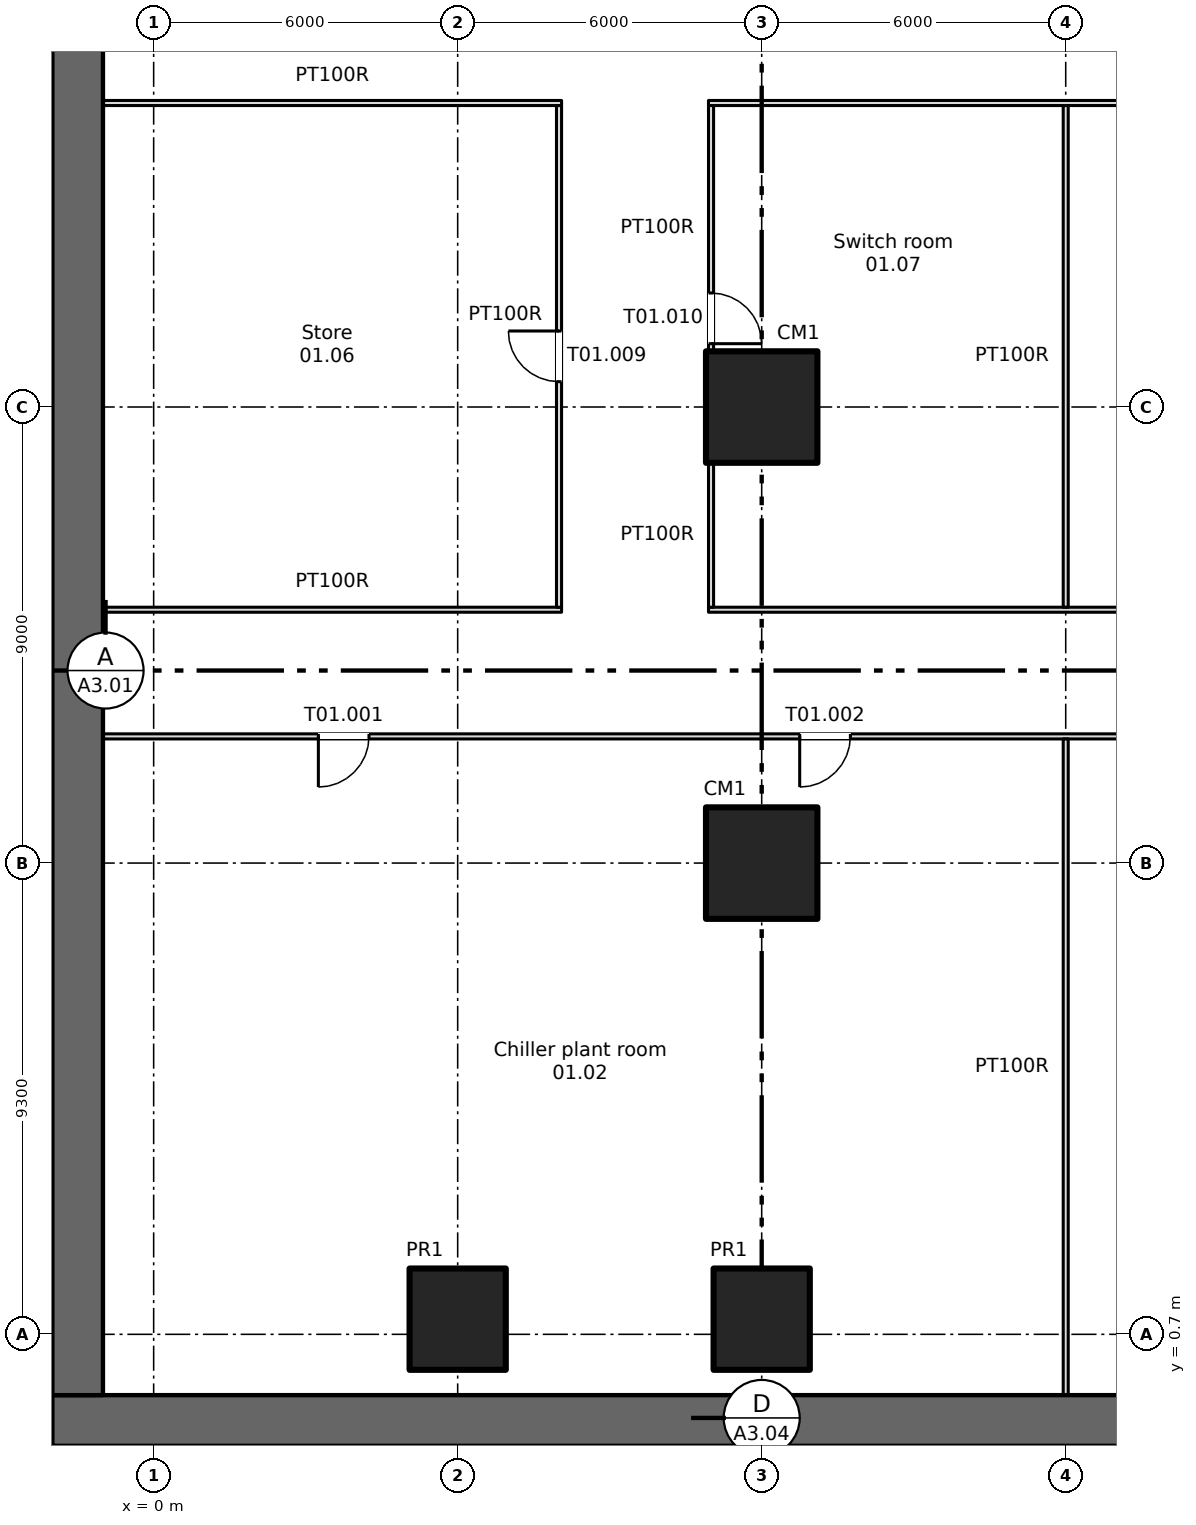
"""IFC4 building model, lengths in metres.
Left out: names, types, materials, properties, quantities, classifications, styles, units other than length and angle.
Written with IfcOpenShell. Run it as: python <this file> out.ifc"""

import sys

from ifc_helpers import new_model, si_unit, direction, frame, frame_2d, origin, origin_2d, place, context, subcontext, project, spatial, rectangle, extrude, element, fill, save


model = new_model("IFC4")
c1 = context("Model", 3, precision=1e-05, world=origin(), true_north=direction((0.0, 1.0)))
c2 = subcontext(c1, "Body", "Model", "MODEL_VIEW")
j1 = project(units=[si_unit("LENGTHUNIT", "METRE"), si_unit("PLANEANGLEUNIT", "RADIAN")], contexts=[c1])
p1 = place(None, origin())
s1 = spatial("IfcSite", under=j1, at=p1, CompositionType="ELEMENT")
p2 = place(p1, origin())
s2 = spatial("IfcBuilding", under=s1, at=p2, CompositionType="ELEMENT")
p3 = place(p2, frame((0.0, 0.0, -12.0)))
s3 = spatial("IfcBuildingStorey", under=s2, at=p3, CompositionType="ELEMENT", Elevation=-12.0)
p4 = place(p3, frame((-2.0, -1.0, 0.0), z_axis=(0.0, 0.0, 1.0), x_axis=(1.0, 0.0, 0.0)))
e1 = element("IfcWall", 1, at=p4, inside=s3, PredefinedType="SOLIDWALL", context=c2, shape_type="SweptSolid", body=[
    extrude(rectangle(XDim=82.0, YDim=1.0, at=frame_2d((41.0, 0.0))), origin(), (0.0, 0.0, 1.0), 5.55),
])
p5 = place(p3, frame((-1.5, -0.5, 0.0), z_axis=(0.0, 0.0, 1.0), x_axis=(0.0, 1.0, 0.0)))
e2 = element("IfcWall", 2, at=p5, inside=s3, PredefinedType="SOLIDWALL", context=c2, shape_type="SweptSolid", body=[
    extrude(rectangle(XDim=46.0, YDim=1.0, at=frame_2d((23.0, 0.0))), origin(), (0.0, 0.0, 1.0), 5.55),
])
for number, where, z_axis, x_axis in (
    (3, (6.0, 1.0, 0.0), (0.0, 0.0, 1.0), (1.0, 0.0, 0.0)),
    (4, (12.0, 1.0, 0.0), (0.0, 0.0, 1.0), (1.0, 0.0, 0.0)),
):
    element("IfcColumn", number, at=place(p3, frame(where, z_axis=z_axis, x_axis=x_axis)), inside=s3, PredefinedType="COLUMN", context=c2, shape_type="SweptSolid", body=[
        extrude(rectangle(XDim=1.9, YDim=2.0, at=origin_2d()), origin(), (0.0, 0.0, 1.0), 5.55),
    ])
for number, where, z_axis, x_axis in (
    (5, (12.0, 10.0, 0.0), (0.0, 0.0, 1.0), (1.0, 0.0, 0.0)),
    (6, (12.0, 19.0, 0.0), (0.0, 0.0, 1.0), (1.0, 0.0, 0.0)),
):
    element("IfcColumn", number, at=place(p3, frame(where, z_axis=z_axis, x_axis=x_axis)), inside=s3, PredefinedType="COLUMN", context=c2, shape_type="SweptSolid", body=[
        extrude(rectangle(XDim=2.2, YDim=2.2, at=origin_2d()), origin(), (0.0, 0.0, 1.0), 5.55),
    ])
p6 = place(p3, frame((-1.0, 12.5, 0.0), z_axis=(0.0, 0.0, 1.0), x_axis=(1.0, 0.0, 0.0)))
e7 = element("IfcWall", 7, at=p6, inside=s3, PredefinedType="PARTITIONING", context=c2, shape_type="SweptSolid", body=[
    extrude(rectangle(XDim=80.0, YDim=0.1, at=frame_2d((40.0, 0.0))), origin(), (0.0, 0.0, 1.0), 5.55),
])
p7 = place(p6, frame((4.25, 0.0, 0.0)))
e8 = element("IfcOpeningElement", 8, at=p7, cuts=e7, PredefinedType="OPENING", context=c2, shape_type="SweptSolid", body=[
    extrude(rectangle(XDim=1.0, YDim=2.1, at=frame_2d((0.5, 1.05))), frame((0.0, 0.06, 0.0), z_axis=(0.0, -1.0, 0.0), x_axis=(1.0, 0.0, 0.0)), (0.0, 0.0, 1.0), 0.12),
])
p8 = place(p6, frame((13.75, 0.0, 0.0)))
e9 = element("IfcOpeningElement", 9, at=p8, cuts=e7, PredefinedType="OPENING", context=c2, shape_type="SweptSolid", body=[
    extrude(rectangle(XDim=1.0, YDim=2.1, at=frame_2d((0.5, 1.05))), frame((0.0, 0.06, 0.0), z_axis=(0.0, -1.0, 0.0), x_axis=(1.0, 0.0, 0.0)), (0.0, 0.0, 1.0), 0.12),
])
p9 = place(p6, frame((21.5, 0.0, 0.0)))
e10 = element("IfcOpeningElement", 10, at=p9, cuts=e7, PredefinedType="OPENING", context=c2, shape_type="SweptSolid", body=[
    extrude(rectangle(XDim=1.0, YDim=2.1, at=frame_2d((0.5, 1.05))), frame((0.0, 0.06, 0.0), z_axis=(0.0, -1.0, 0.0), x_axis=(1.0, 0.0, 0.0)), (0.0, 0.0, 1.0), 0.12),
])
p10 = place(p6, frame((27.5, 0.0, 0.0)))
e11 = element("IfcOpeningElement", 11, at=p10, cuts=e7, PredefinedType="OPENING", context=c2, shape_type="SweptSolid", body=[
    extrude(rectangle(XDim=1.0, YDim=2.1, at=frame_2d((0.5, 1.05))), frame((0.0, 0.06, 0.0), z_axis=(0.0, -1.0, 0.0), x_axis=(1.0, 0.0, 0.0)), (0.0, 0.0, 1.0), 0.12),
])
p11 = place(p6, frame((36.5, 0.0, 0.0)))
e12 = element("IfcOpeningElement", 12, at=p11, cuts=e7, PredefinedType="OPENING", context=c2, shape_type="SweptSolid", body=[
    extrude(rectangle(XDim=1.0, YDim=2.1, at=frame_2d((0.5, 1.05))), frame((0.0, 0.06, 0.0), z_axis=(0.0, -1.0, 0.0), x_axis=(1.0, 0.0, 0.0)), (0.0, 0.0, 1.0), 0.12),
])
p12 = place(p6, frame((48.5, 0.0, 0.0)))
e13 = element("IfcOpeningElement", 13, at=p12, cuts=e7, PredefinedType="OPENING", context=c2, shape_type="SweptSolid", body=[
    extrude(rectangle(XDim=1.0, YDim=2.1, at=frame_2d((0.5, 1.05))), frame((0.0, 0.06, 0.0), z_axis=(0.0, -1.0, 0.0), x_axis=(1.0, 0.0, 0.0)), (0.0, 0.0, 1.0), 0.12),
])
p13 = place(p6, frame((60.75, 0.0, 0.0)))
e14 = element("IfcOpeningElement", 14, at=p13, cuts=e7, PredefinedType="OPENING", context=c2, shape_type="SweptSolid", body=[
    extrude(rectangle(XDim=1.0, YDim=2.1, at=frame_2d((0.5, 1.05))), frame((0.0, 0.06, 0.0), z_axis=(0.0, -1.0, 0.0), x_axis=(1.0, 0.0, 0.0)), (0.0, 0.0, 1.0), 0.12),
])
p14 = place(p6, frame((73.25, 0.0, 0.0)))
e15 = element("IfcOpeningElement", 15, at=p14, cuts=e7, PredefinedType="OPENING", context=c2, shape_type="SweptSolid", body=[
    extrude(rectangle(XDim=1.0, YDim=2.1, at=frame_2d((0.5, 1.05))), frame((0.0, 0.06, 0.0), z_axis=(0.0, -1.0, 0.0), x_axis=(1.0, 0.0, 0.0)), (0.0, 0.0, 1.0), 0.12),
])
p15 = place(p3, frame((-1.0, 15.0, 0.0), z_axis=(0.0, 0.0, 1.0), x_axis=(1.0, 0.0, 0.0)))
e16 = element("IfcWall", 16, at=p15, inside=s3, PredefinedType="PARTITIONING", context=c2, shape_type="SweptSolid", body=[
    extrude(rectangle(XDim=9.05, YDim=0.1, at=frame_2d((4.525, 0.0))), origin(), (0.0, 0.0, 1.0), 5.55),
])
p16 = place(p3, frame((10.95, 15.0, 0.0), z_axis=(0.0, 0.0, 1.0), x_axis=(1.0, 0.0, 0.0)))
e17 = element("IfcWall", 17, at=p16, inside=s3, PredefinedType="PARTITIONING", context=c2, shape_type="SweptSolid", body=[
    extrude(rectangle(XDim=56.1, YDim=0.1, at=frame_2d((28.05, 0.0))), origin(), (0.0, 0.0, 1.0), 5.55),
])
p17 = place(p3, frame((-1.0, 25.0, 0.0), z_axis=(0.0, 0.0, 1.0), x_axis=(1.0, 0.0, 0.0)))
e18 = element("IfcWall", 18, at=p17, inside=s3, PredefinedType="PARTITIONING", context=c2, shape_type="SweptSolid", body=[
    extrude(rectangle(XDim=9.05, YDim=0.1, at=frame_2d((4.525, 0.0))), origin(), (0.0, 0.0, 1.0), 5.55),
])
p18 = place(p3, frame((10.95, 25.0, 0.0), z_axis=(0.0, 0.0, 1.0), x_axis=(1.0, 0.0, 0.0)))
e19 = element("IfcWall", 19, at=p18, inside=s3, PredefinedType="PARTITIONING", context=c2, shape_type="SweptSolid", body=[
    extrude(rectangle(XDim=56.1, YDim=0.1, at=frame_2d((28.05, 0.0))), origin(), (0.0, 0.0, 1.0), 5.55),
])
p19 = place(p18, frame((12.55, 0.0, 0.0)))
e20 = element("IfcOpeningElement", 20, at=p19, cuts=e19, PredefinedType="OPENING", context=c2, shape_type="SweptSolid", body=[
    extrude(rectangle(XDim=1.0, YDim=2.1, at=frame_2d((0.5, 1.05))), frame((0.0, 0.06, 0.0), z_axis=(0.0, -1.0, 0.0), x_axis=(1.0, 0.0, 0.0)), (0.0, 0.0, 1.0), 0.12),
])
p20 = place(p18, frame((24.55, 0.0, 0.0)))
e21 = element("IfcOpeningElement", 21, at=p20, cuts=e19, PredefinedType="OPENING", context=c2, shape_type="SweptSolid", body=[
    extrude(rectangle(XDim=1.0, YDim=2.1, at=frame_2d((0.5, 1.05))), frame((0.0, 0.06, 0.0), z_axis=(0.0, -1.0, 0.0), x_axis=(1.0, 0.0, 0.0)), (0.0, 0.0, 1.0), 0.12),
])
p21 = place(p18, frame((36.55, 0.0, 0.0)))
e22 = element("IfcOpeningElement", 22, at=p21, cuts=e19, PredefinedType="OPENING", context=c2, shape_type="SweptSolid", body=[
    extrude(rectangle(XDim=1.0, YDim=2.1, at=frame_2d((0.5, 1.05))), frame((0.0, 0.06, 0.0), z_axis=(0.0, -1.0, 0.0), x_axis=(1.0, 0.0, 0.0)), (0.0, 0.0, 1.0), 0.12),
])
p22 = place(p18, frame((49.05, 0.0, 0.0)))
e23 = element("IfcOpeningElement", 23, at=p22, cuts=e19, PredefinedType="OPENING", context=c2, shape_type="SweptSolid", body=[
    extrude(rectangle(XDim=1.0, YDim=2.1, at=frame_2d((0.5, 1.05))), frame((0.0, 0.06, 0.0), z_axis=(0.0, -1.0, 0.0), x_axis=(1.0, 0.0, 0.0)), (0.0, 0.0, 1.0), 0.12),
])
p23 = place(p3, frame((8.0, 15.05, 0.0), z_axis=(0.0, 0.0, 1.0), x_axis=(0.0, 1.0, 0.0)))
e24 = element("IfcWall", 24, at=p23, inside=s3, PredefinedType="PARTITIONING", context=c2, shape_type="SweptSolid", body=[
    extrude(rectangle(XDim=9.9, YDim=0.1, at=frame_2d((4.95, 0.0))), origin(), (0.0, 0.0, 1.0), 5.55),
])
p24 = place(p23, frame((4.45, 0.0, 0.0)))
e25 = element("IfcOpeningElement", 25, at=p24, cuts=e24, PredefinedType="OPENING", context=c2, shape_type="SweptSolid", body=[
    extrude(rectangle(XDim=1.0, YDim=2.1, at=frame_2d((0.5, 1.05))), frame((0.0, 0.06, 0.0), z_axis=(0.0, -1.0, 0.0), x_axis=(1.0, 0.0, 0.0)), (0.0, 0.0, 1.0), 0.12),
])
p25 = place(p3, frame((11.0, 15.05, 0.0), z_axis=(0.0, 0.0, 1.0), x_axis=(0.0, 1.0, 0.0)))
e26 = element("IfcWall", 26, at=p25, inside=s3, PredefinedType="PARTITIONING", context=c2, shape_type="SweptSolid", body=[
    extrude(rectangle(XDim=2.85, YDim=0.1, at=frame_2d((1.425, 0.0))), origin(), (0.0, 0.0, 1.0), 5.55),
])
p26 = place(p3, frame((11.0, 20.1, 0.0), z_axis=(0.0, 0.0, 1.0), x_axis=(0.0, 1.0, 0.0)))
e27 = element("IfcWall", 27, at=p26, inside=s3, PredefinedType="PARTITIONING", context=c2, shape_type="SweptSolid", body=[
    extrude(rectangle(XDim=4.85, YDim=0.1, at=frame_2d((2.425, 0.0))), origin(), (0.0, 0.0, 1.0), 5.55),
])
p27 = place(p26, frame((0.15, 0.0, 0.0)))
e28 = element("IfcOpeningElement", 28, at=p27, cuts=e27, PredefinedType="OPENING", context=c2, shape_type="SweptSolid", body=[
    extrude(rectangle(XDim=1.0, YDim=2.1, at=frame_2d((0.5, 1.05))), frame((0.0, 0.06, 0.0), z_axis=(0.0, -1.0, 0.0), x_axis=(1.0, 0.0, 0.0)), (0.0, 0.0, 1.0), 0.12),
])
p28 = place(p3, frame((18.0, -0.5, 0.0), z_axis=(0.0, 0.0, 1.0), x_axis=(0.0, 1.0, 0.0)))
e29 = element("IfcWall", 29, at=p28, inside=s3, PredefinedType="PARTITIONING", context=c2, shape_type="SweptSolid", body=[
    extrude(rectangle(XDim=12.95, YDim=0.1, at=frame_2d((6.475, 0.0))), origin(), (0.0, 0.0, 1.0), 5.55),
])
p29 = place(p3, frame((18.0, 15.05, 0.0), z_axis=(0.0, 0.0, 1.0), x_axis=(0.0, 1.0, 0.0)))
e30 = element("IfcWall", 30, at=p29, inside=s3, PredefinedType="PARTITIONING", context=c2, shape_type="SweptSolid", body=[
    extrude(rectangle(XDim=9.9, YDim=0.1, at=frame_2d((4.95, 0.0))), origin(), (0.0, 0.0, 1.0), 5.55),
])
p30 = place(p7, origin())
e31 = element("IfcDoor", 31, at=p30, inside=s3, OperationType="SINGLE_SWING_LEFT", PredefinedType="DOOR", context=c2, shape_type="SweptSolid", body=[
    extrude(rectangle(XDim=1.0, YDim=2.1, at=frame_2d((0.5, 1.05))), frame((0.0, 0.025, 0.0), z_axis=(0.0, -1.0, 0.0), x_axis=(1.0, 0.0, 0.0)), (0.0, 0.0, 1.0), 0.05),
])
fill(e8, e31)
p31 = place(p8, origin())
e32 = element("IfcDoor", 32, at=p31, inside=s3, OperationType="SINGLE_SWING_LEFT", PredefinedType="DOOR", context=c2, shape_type="SweptSolid", body=[
    extrude(rectangle(XDim=1.0, YDim=2.1, at=frame_2d((0.5, 1.05))), frame((0.0, 0.025, 0.0), z_axis=(0.0, -1.0, 0.0), x_axis=(1.0, 0.0, 0.0)), (0.0, 0.0, 1.0), 0.05),
])
fill(e9, e32)
p32 = place(p24, origin())
e33 = element("IfcDoor", 33, at=p32, inside=s3, OperationType="SINGLE_SWING_RIGHT", PredefinedType="DOOR", context=c2, shape_type="SweptSolid", body=[
    extrude(rectangle(XDim=1.0, YDim=2.1, at=frame_2d((0.5, 1.05))), frame((0.0, 0.025, 0.0), z_axis=(0.0, -1.0, 0.0), x_axis=(1.0, 0.0, 0.0)), (0.0, 0.0, 1.0), 0.05),
])
fill(e25, e33)
p33 = place(p27, origin())
e34 = element("IfcDoor", 34, at=p33, inside=s3, OperationType="SINGLE_SWING_LEFT", PredefinedType="DOOR", context=c2, shape_type="SweptSolid", body=[
    extrude(rectangle(XDim=1.0, YDim=2.1, at=frame_2d((0.5, 1.05))), frame((0.0, 0.025, 0.0), z_axis=(0.0, -1.0, 0.0), x_axis=(1.0, 0.0, 0.0)), (0.0, 0.0, 1.0), 0.05),
])
fill(e28, e34)
save(model, sys.argv[1])
